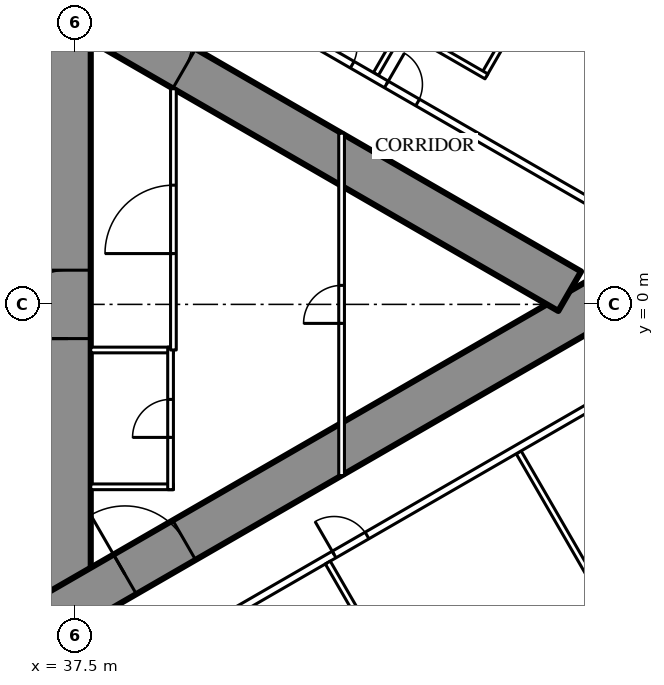
"""IFC4 building model, lengths in metres.
Left out: names, types, materials, properties, quantities, classifications, styles, units other than length and angle.
Written with IfcOpenShell. Run it as: python <this file> out.ifc"""

import sys

from ifc_helpers import new_model, si_unit, direction, frame, frame_2d, origin, place, context, subcontext, project, spatial, rectangle, extrude, element, fill, save


model = new_model("IFC4")
c1 = context("Model", 3, precision=1e-05, world=origin(), true_north=direction((0.0, 1.0)))
c2 = subcontext(c1, "Body", "Model", "MODEL_VIEW")
j1 = project(units=[si_unit("LENGTHUNIT", "METRE"), si_unit("PLANEANGLEUNIT", "RADIAN")], contexts=[c1])
p1 = place(None, origin())
s1 = spatial("IfcSite", under=j1, at=p1, CompositionType="ELEMENT")
p2 = place(p1, origin())
s2 = spatial("IfcBuilding", under=s1, at=p2, CompositionType="ELEMENT")
p3 = place(p2, frame((0.0, 0.0, 42.5)))
s3 = spatial("IfcBuildingStorey", under=s2, at=p3, CompositionType="ELEMENT", Elevation=42.5)
p4 = place(p3, frame((37.3, -8.6, 0.0), z_axis=(0.0, 0.0, 1.0), x_axis=(0.0, 1.0, 0.0)))
e1 = element("IfcWall", 1, at=p4, inside=s3, PredefinedType="SHEAR", context=c2, shape_type="SweptSolid", body=[
    extrude(rectangle(XDim=17.2, YDim=1.2, at=frame_2d((8.6, 0.0))), origin(), (0.0, 0.0, 1.0), 3.5),
])
p5 = place(p4, frame((7.7, 0.0, 0.0)))
e2 = element("IfcOpeningElement", 2, at=p5, cuts=e1, PredefinedType="OPENING", context=c2, shape_type="SweptSolid", body=[
    extrude(rectangle(XDim=1.8, YDim=2.2, at=frame_2d((0.9, 1.1))), frame((0.0, 0.61, 0.0), z_axis=(0.0, -1.0, 0.0), x_axis=(1.0, 0.0, 0.0)), (0.0, 0.0, 1.0), 1.22),
])
p6 = place(p3, frame((27.2, -13.8, 0.0), z_axis=(0.0, 0.0, 1.0), x_axis=(0.866027159892, 0.499996958321, 0.0)))
e3 = element("IfcWall", 3, at=p6, inside=s3, PredefinedType="SHEAR", context=c2, shape_type="SweptSolid", body=[
    extrude(rectangle(XDim=27.947, YDim=1.2, at=frame_2d((13.973, 0.0))), origin(), (0.0, 0.0, 1.0), 3.5),
])
p7 = place(p6, frame((4.6, 0.0, 0.0)))
e4 = element("IfcOpeningElement", 4, at=p7, cuts=e3, PredefinedType="OPENING", context=c2, shape_type="SweptSolid", body=[
    extrude(rectangle(XDim=1.0, YDim=2.2, at=frame_2d((0.5, 1.1))), frame((0.0, 0.61, 0.0), z_axis=(0.0, -1.0, 0.0), x_axis=(1.0, 0.0, 0.0)), (0.0, 0.0, 1.0), 1.22),
])
p8 = place(p6, frame((13.395, 0.0, 0.0)))
e5 = element("IfcOpeningElement", 5, at=p8, cuts=e3, PredefinedType="OPENING", context=c2, shape_type="SweptSolid", body=[
    extrude(rectangle(XDim=1.8, YDim=2.2, at=frame_2d((0.9, 1.1))), frame((0.0, 0.61, 0.0), z_axis=(0.0, -1.0, 0.0), x_axis=(1.0, 0.0, 0.0)), (0.0, 0.0, 1.0), 1.22),
])
p9 = place(p3, frame((27.2, 13.8, 0.0), z_axis=(0.0, 0.0, 1.0), x_axis=(0.866024515034, -0.500001539357, 0.0)))
e6 = element("IfcWall", 6, at=p9, inside=s3, PredefinedType="SHEAR", context=c2, shape_type="SweptSolid", body=[
    extrude(rectangle(XDim=26.907, YDim=1.2, at=frame_2d((13.454, 0.0))), origin(), (0.0, 0.0, 1.0), 3.5),
])
p10 = place(p9, frame((4.6, 0.0, 0.0)))
e7 = element("IfcOpeningElement", 7, at=p10, cuts=e6, PredefinedType="OPENING", context=c2, shape_type="SweptSolid", body=[
    extrude(rectangle(XDim=1.0, YDim=2.2, at=frame_2d((0.5, 1.1))), frame((0.0, 0.61, 0.0), z_axis=(0.0, -1.0, 0.0), x_axis=(1.0, 0.0, 0.0)), (0.0, 0.0, 1.0), 1.22),
])
p11 = place(p9, frame((13.395, 0.0, 0.0)))
e8 = element("IfcOpeningElement", 8, at=p11, cuts=e6, PredefinedType="OPENING", context=c2, shape_type="SweptSolid", body=[
    extrude(rectangle(XDim=1.8, YDim=2.2, at=frame_2d((0.9, 1.1))), frame((0.0, 0.61, 0.0), z_axis=(0.0, -1.0, 0.0), x_axis=(1.0, 0.0, 0.0)), (0.0, 0.0, 1.0), 1.22),
])
p12 = place(p3, frame((49.159, -3.893, 0.0), z_axis=(0.0, 0.0, 1.0), x_axis=(0.499998773722, -0.866026111775, 0.0)))
e9 = element("IfcWall", 9, at=p12, inside=s3, PredefinedType="PARTITIONING", context=c2, shape_type="SweptSolid", body=[
    extrude(rectangle(XDim=9.892, YDim=0.15, at=frame_2d((4.946, 0.0))), origin(), (0.0, 0.0, 1.0), 2.25),
])
p13 = place(p3, frame((45.403, 6.062, 0.0), z_axis=(0.0, 0.0, 1.0), x_axis=(0.500013434677, 0.866017647131, 0.0)))
e10 = element("IfcWall", 10, at=p13, inside=s3, PredefinedType="PARTITIONING", context=c2, shape_type="SweptSolid", body=[
    extrude(rectangle(XDim=9.902, YDim=0.15, at=frame_2d((4.951, 0.0))), origin(), (0.0, 0.0, 1.0), 2.25),
])
p14 = place(p3, frame((37.96, -10.243, 0.0), z_axis=(0.0, 0.0, 1.0), x_axis=(0.866026429433, 0.499998223521, 0.0)))
e11 = element("IfcWall", 11, at=p14, inside=s3, PredefinedType="PARTITIONING", context=c2, shape_type="SweptSolid", body=[
    extrude(rectangle(XDim=20.487, YDim=0.2, at=frame_2d((10.243, 0.0))), origin(), (0.0, 0.0, 1.0), 3.25),
])
p15 = place(p14, frame((7.325, 0.0, 0.0)))
e12 = element("IfcOpeningElement", 12, at=p15, cuts=e11, PredefinedType="OPENING", context=c2, shape_type="SweptSolid", body=[
    extrude(rectangle(XDim=1.0, YDim=2.2, at=frame_2d((0.5, 1.1))), frame((0.0, 0.11, 0.0), z_axis=(0.0, -1.0, 0.0), x_axis=(1.0, 0.0, 0.0)), (0.0, 0.0, 1.0), 0.22),
])
p16 = place(p14, frame((18.937, 0.0, 0.0)))
e13 = element("IfcOpeningElement", 13, at=p16, cuts=e11, PredefinedType="OPENING", context=c2, shape_type="SweptSolid", body=[
    extrude(rectangle(XDim=0.95, YDim=2.2, at=frame_2d((0.475, 1.1))), frame((0.0, 0.11, 0.0), z_axis=(0.0, -1.0, 0.0), x_axis=(1.0, 0.0, 0.0)), (0.0, 0.0, 1.0), 0.22),
])
p17 = place(p14, frame((0.6, 0.0, 0.0)))
e14 = element("IfcOpeningElement", 14, at=p17, cuts=e11, PredefinedType="OPENING", context=c2, shape_type="SweptSolid", body=[
    extrude(rectangle(XDim=0.95, YDim=2.2, at=frame_2d((0.475, 1.1))), frame((0.0, 0.11, 0.0), z_axis=(0.0, -1.0, 0.0), x_axis=(1.0, 0.0, 0.0)), (0.0, 0.0, 1.0), 0.22),
])
p18 = place(p3, frame((36.834, 10.894, 0.0), z_axis=(0.0, 0.0, 1.0), x_axis=(0.866028157229, -0.499995230863, 0.0)))
e15 = element("IfcWall", 15, at=p18, inside=s3, PredefinedType="PARTITIONING", context=c2, shape_type="SweptSolid", body=[
    extrude(rectangle(XDim=21.667, YDim=0.2, at=frame_2d((10.833, 0.0))), origin(), (0.0, 0.0, 1.0), 3.25),
])
p19 = place(p18, frame((18.885, 0.0, 0.0)))
e16 = element("IfcOpeningElement", 16, at=p19, cuts=e15, PredefinedType="OPENING", context=c2, shape_type="SweptSolid", body=[
    extrude(rectangle(XDim=0.95, YDim=2.2, at=frame_2d((0.475, 1.1))), frame((0.0, 0.11, 0.0), z_axis=(0.0, -1.0, 0.0), x_axis=(1.0, 0.0, 0.0)), (0.0, 0.0, 1.0), 0.22),
])
p20 = place(p18, frame((10.212, 0.0, 0.0)))
e17 = element("IfcOpeningElement", 17, at=p20, cuts=e15, PredefinedType="OPENING", context=c2, shape_type="SweptSolid", body=[
    extrude(rectangle(XDim=0.95, YDim=2.2, at=frame_2d((0.475, 1.1))), frame((0.0, 0.11, 0.0), z_axis=(0.0, -1.0, 0.0), x_axis=(1.0, 0.0, 0.0)), (0.0, 0.0, 1.0), 0.22),
])
p21 = place(p18, frame((8.225, 0.0, 0.0)))
e18 = element("IfcOpeningElement", 18, at=p21, cuts=e15, PredefinedType="OPENING", context=c2, shape_type="SweptSolid", body=[
    extrude(rectangle(XDim=0.95, YDim=2.2, at=frame_2d((0.475, 1.1))), frame((0.0, 0.11, 0.0), z_axis=(0.0, -1.0, 0.0), x_axis=(1.0, 0.0, 0.0)), (0.0, 0.0, 1.0), 0.22),
])
p22 = place(p18, frame((1.825, 0.0, 0.0)))
e19 = element("IfcOpeningElement", 19, at=p22, cuts=e15, PredefinedType="OPENING", context=c2, shape_type="SweptSolid", body=[
    extrude(rectangle(XDim=0.95, YDim=2.2, at=frame_2d((0.475, 1.1))), frame((0.0, 0.11, 0.0), z_axis=(0.0, -1.0, 0.0), x_axis=(1.0, 0.0, 0.0)), (0.0, 0.0, 1.0), 0.22),
])
p23 = place(p18, frame((0.246, 0.0, 0.0)))
e20 = element("IfcOpeningElement", 20, at=p23, cuts=e15, PredefinedType="OPENING", context=c2, shape_type="SweptSolid", body=[
    extrude(rectangle(XDim=0.9, YDim=2.2, at=frame_2d((0.45, 1.1))), frame((0.0, 0.11, 0.0), z_axis=(0.0, -1.0, 0.0), x_axis=(1.0, 0.0, 0.0)), (0.0, 0.0, 1.0), 0.22),
])
p24 = place(p3, frame((44.137, -6.792, 0.0), z_axis=(0.0, 0.0, 1.0), x_axis=(0.49994636267, -0.866056369097, 0.0)))
e21 = element("IfcWall", 21, at=p24, inside=s3, PredefinedType="PARTITIONING", context=c2, shape_type="SweptSolid", body=[
    extrude(rectangle(XDim=2.8, YDim=0.15, at=frame_2d((1.4, 0.0))), origin(), (0.0, 0.0, 1.0), 3.25),
])
p25 = place(p24, frame((1.55, 0.0, 0.0)))
e22 = element("IfcOpeningElement", 22, at=p25, cuts=e21, PredefinedType="OPENING", context=c2, shape_type="SweptSolid", body=[
    extrude(rectangle(XDim=1.0, YDim=2.2, at=frame_2d((0.5, 1.1))), frame((0.0, 0.085, 0.0), z_axis=(0.0, -1.0, 0.0), x_axis=(1.0, 0.0, 0.0)), (0.0, 0.0, 1.0), 0.17),
])
p26 = place(p3, frame((48.246, 6.037, 0.0), z_axis=(0.0, 0.0, 1.0), x_axis=(0.500006934395, 0.866021400173, 0.0)))
e23 = element("IfcWall", 23, at=p26, inside=s3, PredefinedType="PARTITIONING", context=c2, shape_type="SweptSolid", body=[
    extrude(rectangle(XDim=2.6, YDim=0.15, at=frame_2d((1.3, 0.0))), origin(), (0.0, 0.0, 1.0), 3.25),
])
p27 = place(p26, frame((0.9, 0.0, 0.0)))
e24 = element("IfcOpeningElement", 24, at=p27, cuts=e23, PredefinedType="OPENING", context=c2, shape_type="SweptSolid", body=[
    extrude(rectangle(XDim=0.8, YDim=2.2, at=frame_2d((0.4, 1.1))), frame((0.0, 0.085, 0.0), z_axis=(0.0, -1.0, 0.0), x_axis=(1.0, 0.0, 0.0)), (0.0, 0.0, 1.0), 0.17),
])
p28 = place(p3, frame((46.168, 7.237, 0.0), z_axis=(0.0, 0.0, 1.0), x_axis=(0.866006523861, -0.500032699561, 0.0)))
e25 = element("IfcWall", 25, at=p28, inside=s3, PredefinedType="PARTITIONING", context=c2, shape_type="SweptSolid", body=[
    extrude(rectangle(XDim=2.475, YDim=0.15, at=frame_2d((1.237, 0.0))), origin(), (0.0, 0.0, 1.0), 3.25),
])
for number, where, z_axis, x_axis in (
    (26, (37.9, -1.2, 0.0), (0.0, 0.0, 1.0), (1.0, 0.0, 0.0)),
    (27, (37.9, -4.8, 0.0), (0.0, 0.0, 1.0), (1.0, 0.0, 0.0)),
):
    element("IfcWall", number, at=place(p3, frame(where, z_axis=z_axis, x_axis=x_axis)), inside=s3, PredefinedType="PARTITIONING", context=c2, shape_type="SweptSolid", body=[
        extrude(rectangle(XDim=2.175, YDim=0.15, at=frame_2d((1.087, 0.0))), origin(), (0.0, 0.0, 1.0), 3.25),
    ])
p29 = place(p3, frame((40.0, -4.875, 0.0), z_axis=(0.0, 0.0, 1.0), x_axis=(0.0, 1.0, 0.0)))
e28 = element("IfcWall", 28, at=p29, inside=s3, PredefinedType="PARTITIONING", context=c2, shape_type="SweptSolid", body=[
    extrude(rectangle(XDim=3.75, YDim=0.15, at=frame_2d((1.875, 0.0))), origin(), (0.0, 0.0, 1.0), 3.25),
])
p30 = place(p29, frame((1.375, 0.0, 0.0)))
e29 = element("IfcOpeningElement", 29, at=p30, cuts=e28, PredefinedType="OPENING", context=c2, shape_type="SweptSolid", body=[
    extrude(rectangle(XDim=1.0, YDim=2.2, at=frame_2d((0.5, 1.1))), frame((0.0, 0.085, 0.0), z_axis=(0.0, -1.0, 0.0), x_axis=(1.0, 0.0, 0.0)), (0.0, 0.0, 1.0), 0.17),
])
p31 = place(p3, frame((40.075, -1.2, 0.0), z_axis=(0.0, 0.0, 1.0), x_axis=(0.0, 1.0, 0.0)))
e30 = element("IfcWall", 30, at=p31, inside=s3, PredefinedType="PARTITIONING", context=c2, shape_type="SweptSolid", body=[
    extrude(rectangle(XDim=6.874, YDim=0.15, at=frame_2d((3.437, 0.0))), origin(), (0.0, 0.0, 1.0), 3.25),
])
p32 = place(p31, frame((2.537, 0.0, 0.0)))
e31 = element("IfcOpeningElement", 31, at=p32, cuts=e30, PredefinedType="OPENING", context=c2, shape_type="SweptSolid", body=[
    extrude(rectangle(XDim=1.8, YDim=2.2, at=frame_2d((0.9, 1.1))), frame((0.0, 0.085, 0.0), z_axis=(0.0, -1.0, 0.0), x_axis=(1.0, 0.0, 0.0)), (0.0, 0.0, 1.0), 0.17),
])
p33 = place(p3, frame((44.5, -4.505, 0.0), z_axis=(0.0, 0.0, 1.0), x_axis=(0.0, 1.0, 0.0)))
e32 = element("IfcWall", 32, at=p33, inside=s3, PredefinedType="PARTITIONING", context=c2, shape_type="SweptSolid", body=[
    extrude(rectangle(XDim=9.009, YDim=0.15, at=frame_2d((4.505, 0.0))), origin(), (0.0, 0.0, 1.0), 2.45),
])
p34 = place(p33, frame((4.005, 0.0, 0.0)))
e33 = element("IfcOpeningElement", 33, at=p34, cuts=e32, PredefinedType="OPENING", context=c2, shape_type="SweptSolid", body=[
    extrude(rectangle(XDim=1.0, YDim=2.2, at=frame_2d((0.5, 1.1))), frame((0.0, 0.085, 0.0), z_axis=(0.0, -1.0, 0.0), x_axis=(1.0, 0.0, 0.0)), (0.0, 0.0, 1.0), 0.17),
])
p35 = place(p15, origin())
e34 = element("IfcDoor", 34, at=p35, inside=s3, OperationType="SINGLE_SWING_LEFT", PredefinedType="DOOR", context=c2, shape_type="SweptSolid", body=[
    extrude(rectangle(XDim=1.0, YDim=2.2, at=frame_2d((0.5, 1.1))), frame((0.0, 0.025, 0.0), z_axis=(0.0, -1.0, 0.0), x_axis=(1.0, 0.0, 0.0)), (0.0, 0.0, 1.0), 0.05),
])
fill(e12, e34)
p36 = place(p20, origin())
e35 = element("IfcDoor", 35, at=p36, inside=s3, OperationType="SINGLE_SWING_LEFT", PredefinedType="DOOR", context=c2, shape_type="SweptSolid", body=[
    extrude(rectangle(XDim=0.95, YDim=2.2, at=frame_2d((0.475, 1.1))), frame((0.0, 0.025, 0.0), z_axis=(0.0, -1.0, 0.0), x_axis=(1.0, 0.0, 0.0)), (0.0, 0.0, 1.0), 0.05),
])
fill(e17, e35)
p37 = place(p21, origin())
e36 = element("IfcDoor", 36, at=p37, inside=s3, OperationType="SINGLE_SWING_LEFT", PredefinedType="DOOR", context=c2, shape_type="SweptSolid", body=[
    extrude(rectangle(XDim=0.95, YDim=2.2, at=frame_2d((0.475, 1.1))), frame((0.0, 0.025, 0.0), z_axis=(0.0, -1.0, 0.0), x_axis=(1.0, 0.0, 0.0)), (0.0, 0.0, 1.0), 0.05),
])
fill(e18, e36)
p38 = place(p30, origin())
e37 = element("IfcDoor", 37, at=p38, inside=s3, OperationType="SINGLE_SWING_LEFT", PredefinedType="DOOR", context=c2, shape_type="SweptSolid", body=[
    extrude(rectangle(XDim=1.0, YDim=2.2, at=frame_2d((0.5, 1.1))), frame((0.0, 0.025, 0.0), z_axis=(0.0, -1.0, 0.0), x_axis=(1.0, 0.0, 0.0)), (0.0, 0.0, 1.0), 0.05),
])
fill(e29, e37)
p39 = place(p32, origin())
e38 = element("IfcDoor", 38, at=p39, inside=s3, OperationType="DOUBLE_DOOR_SINGLE_SWING", PredefinedType="DOOR", context=c2, shape_type="SweptSolid", body=[
    extrude(rectangle(XDim=1.8, YDim=2.2, at=frame_2d((0.9, 1.1))), frame((0.0, 0.025, 0.0), z_axis=(0.0, -1.0, 0.0), x_axis=(1.0, 0.0, 0.0)), (0.0, 0.0, 1.0), 0.05),
])
fill(e31, e38)
p40 = place(p34, origin())
e39 = element("IfcDoor", 39, at=p40, inside=s3, OperationType="SINGLE_SWING_LEFT", PredefinedType="DOOR", context=c2, shape_type="SweptSolid", body=[
    extrude(rectangle(XDim=1.0, YDim=2.2, at=frame_2d((0.5, 1.1))), frame((0.0, 0.025, 0.0), z_axis=(0.0, -1.0, 0.0), x_axis=(1.0, 0.0, 0.0)), (0.0, 0.0, 1.0), 0.05),
])
fill(e33, e39)
p41 = place(p8, origin())
e40 = element("IfcDoor", 40, at=p41, inside=s3, OperationType="DOUBLE_DOOR_SINGLE_SWING", PredefinedType="DOOR", context=c2, shape_type="SweptSolid", body=[
    extrude(rectangle(XDim=1.8, YDim=2.2, at=frame_2d((0.9, 1.1))), frame((0.0, 0.025, 0.0), z_axis=(0.0, -1.0, 0.0), x_axis=(1.0, 0.0, 0.0)), (0.0, 0.0, 1.0), 0.05),
])
fill(e5, e40)
p42 = place(p11, origin())
e41 = element("IfcDoor", 41, at=p42, inside=s3, OperationType="DOUBLE_DOOR_SINGLE_SWING", PredefinedType="DOOR", context=c2, shape_type="SweptSolid", body=[
    extrude(rectangle(XDim=1.8, YDim=2.2, at=frame_2d((0.9, 1.1))), frame((0.0, 0.025, 0.0), z_axis=(0.0, -1.0, 0.0), x_axis=(1.0, 0.0, 0.0)), (0.0, 0.0, 1.0), 0.05),
])
fill(e8, e41)
p43 = place(p5, origin())
e42 = element("IfcDoor", 42, at=p43, inside=s3, OperationType="DOUBLE_DOOR_SINGLE_SWING", PredefinedType="DOOR", context=c2, shape_type="SweptSolid", body=[
    extrude(rectangle(XDim=1.8, YDim=2.2, at=frame_2d((0.9, 1.1))), frame((0.0, 0.025, 0.0), z_axis=(0.0, -1.0, 0.0), x_axis=(1.0, 0.0, 0.0)), (0.0, 0.0, 1.0), 0.05),
])
fill(e2, e42)
save(model, sys.argv[1])
